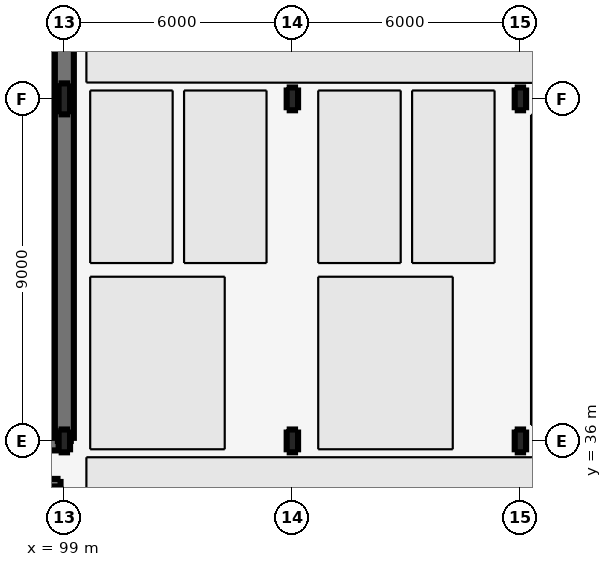
"""IFC4 building model, lengths in metres.
Left out: names, types, materials, properties, quantities, classifications, styles, units other than length and angle.
Written with IfcOpenShell. Run it as: python <this file> out.ifc"""

import sys

from ifc_helpers import new_model, si_unit, direction, frame, frame_2d, origin, origin_2d, place, context, subcontext, project, spatial, rectangle, i_section, extrude, element, save


model = new_model("IFC4")
c1 = context("Model", 3, precision=1e-05, world=origin(), true_north=direction((0.0, 1.0)))
c2 = subcontext(c1, "Body", "Model", "MODEL_VIEW")
j1 = project(units=[si_unit("LENGTHUNIT", "METRE"), si_unit("PLANEANGLEUNIT", "RADIAN")], contexts=[c1])
p1 = place(None, origin())
s1 = spatial("IfcSite", under=j1, at=p1, CompositionType="ELEMENT")
p2 = place(p1, origin())
s2 = spatial("IfcBuilding", under=s1, at=p2, CompositionType="ELEMENT")
p3 = place(p2, frame((0.0, 0.0, -4.8)))
s3 = spatial("IfcBuildingStorey", under=s2, at=p3, CompositionType="ELEMENT", Elevation=-4.8)
p4 = place(p3, frame((99.0, 36.0, 0.0), z_axis=(0.0, 0.0, 1.0), x_axis=(1.0, 0.0, 0.0)))
e1 = element("IfcColumn", 1, at=p4, inside=s3, PredefinedType="COLUMN", context=c2, shape_type="SweptSolid", body=[
    extrude(i_section(OverallWidth=0.3, OverallDepth=0.6, WebThickness=0.015, FlangeThickness=0.03, FilletRadius=0.027, at=origin_2d()), origin(), (0.0, 0.0, 1.0), 4.8),
])
p5 = place(p3, frame((99.0, 45.0, 0.0), z_axis=(0.0, 0.0, 1.0), x_axis=(1.0, 0.0, 0.0)))
e2 = element("IfcColumn", 2, at=p5, inside=s3, PredefinedType="COLUMN", context=c2, shape_type="SweptSolid", body=[
    extrude(i_section(OverallWidth=0.303, OverallDepth=0.814, WebThickness=0.021, FlangeThickness=0.04, FilletRadius=0.03, at=origin_2d()), origin(), (0.0, 0.0, 1.0), 4.8),
])
for number, where, z_axis, x_axis in (
    (3, (105.0, 36.0, 0.0), (0.0, 0.0, 1.0), (1.0, 0.0, 0.0)),
    (4, (105.0, 45.0, 0.0), (0.0, 0.0, 1.0), (1.0, 0.0, 0.0)),
    (5, (111.0, 36.0, 0.0), (0.0, 0.0, 1.0), (1.0, 0.0, 0.0)),
    (6, (111.0, 45.0, 0.0), (0.0, 0.0, 1.0), (1.0, 0.0, 0.0)),
):
    element("IfcColumn", number, at=place(p3, frame(where, z_axis=z_axis, x_axis=x_axis)), inside=s3, PredefinedType="COLUMN", context=c2, shape_type="SweptSolid", body=[
        extrude(i_section(OverallWidth=0.3, OverallDepth=0.6, WebThickness=0.015, FlangeThickness=0.03, FilletRadius=0.027, at=origin_2d()), origin(), (0.0, 0.0, 1.0), 4.8),
    ])
p6 = place(p3, frame((54.0, 36.0, 0.0), z_axis=(0.0, 0.0, 1.0), x_axis=(1.0, 0.0, 0.0)))
e7 = element("IfcWall", 7, at=p6, inside=s3, PredefinedType="SOLIDWALL", context=c2, shape_type="SweptSolid", body=[
    extrude(rectangle(XDim=45.0, YDim=0.5, at=frame_2d((22.5, 0.0))), origin(), (0.0, 0.0, 1.0), 4.5),
])
p7 = place(p3, frame((99.0, 36.0, 0.0), z_axis=(0.0, 0.0, 1.0), x_axis=(0.0, 1.0, 0.0)))
e8 = element("IfcWall", 8, at=p7, inside=s3, PredefinedType="SOLIDWALL", context=c2, shape_type="SweptSolid", body=[
    extrude(rectangle(XDim=16.2, YDim=0.5, at=frame_2d((8.1, 0.0))), origin(), (0.0, 0.0, 1.0), 4.5),
])
p8 = place(p3, frame((90.9, 34.8, 0.0), z_axis=(0.0, 0.0, 1.0), x_axis=(1.0, 0.0, 0.0)))
e9 = element("IfcWall", 9, at=p8, inside=s3, PredefinedType="SHEAR", context=c2, shape_type="SweptSolid", body=[
    extrude(rectangle(XDim=8.0, YDim=0.4, at=frame_2d((4.0, 0.0))), origin(), (0.0, 0.0, 1.0), 4.8),
])
p9 = place(p3, frame((98.7, 27.4, 0.0), z_axis=(0.0, 0.0, 1.0), x_axis=(0.0, 1.0, 0.0)))
e10 = element("IfcWall", 10, at=p9, inside=s3, PredefinedType="SHEAR", context=c2, shape_type="SweptSolid", body=[
    extrude(rectangle(XDim=7.4, YDim=0.4, at=frame_2d((3.7, 0.0))), origin(), (0.0, 0.0, 1.0), 4.8),
])
save(model, sys.argv[1])
